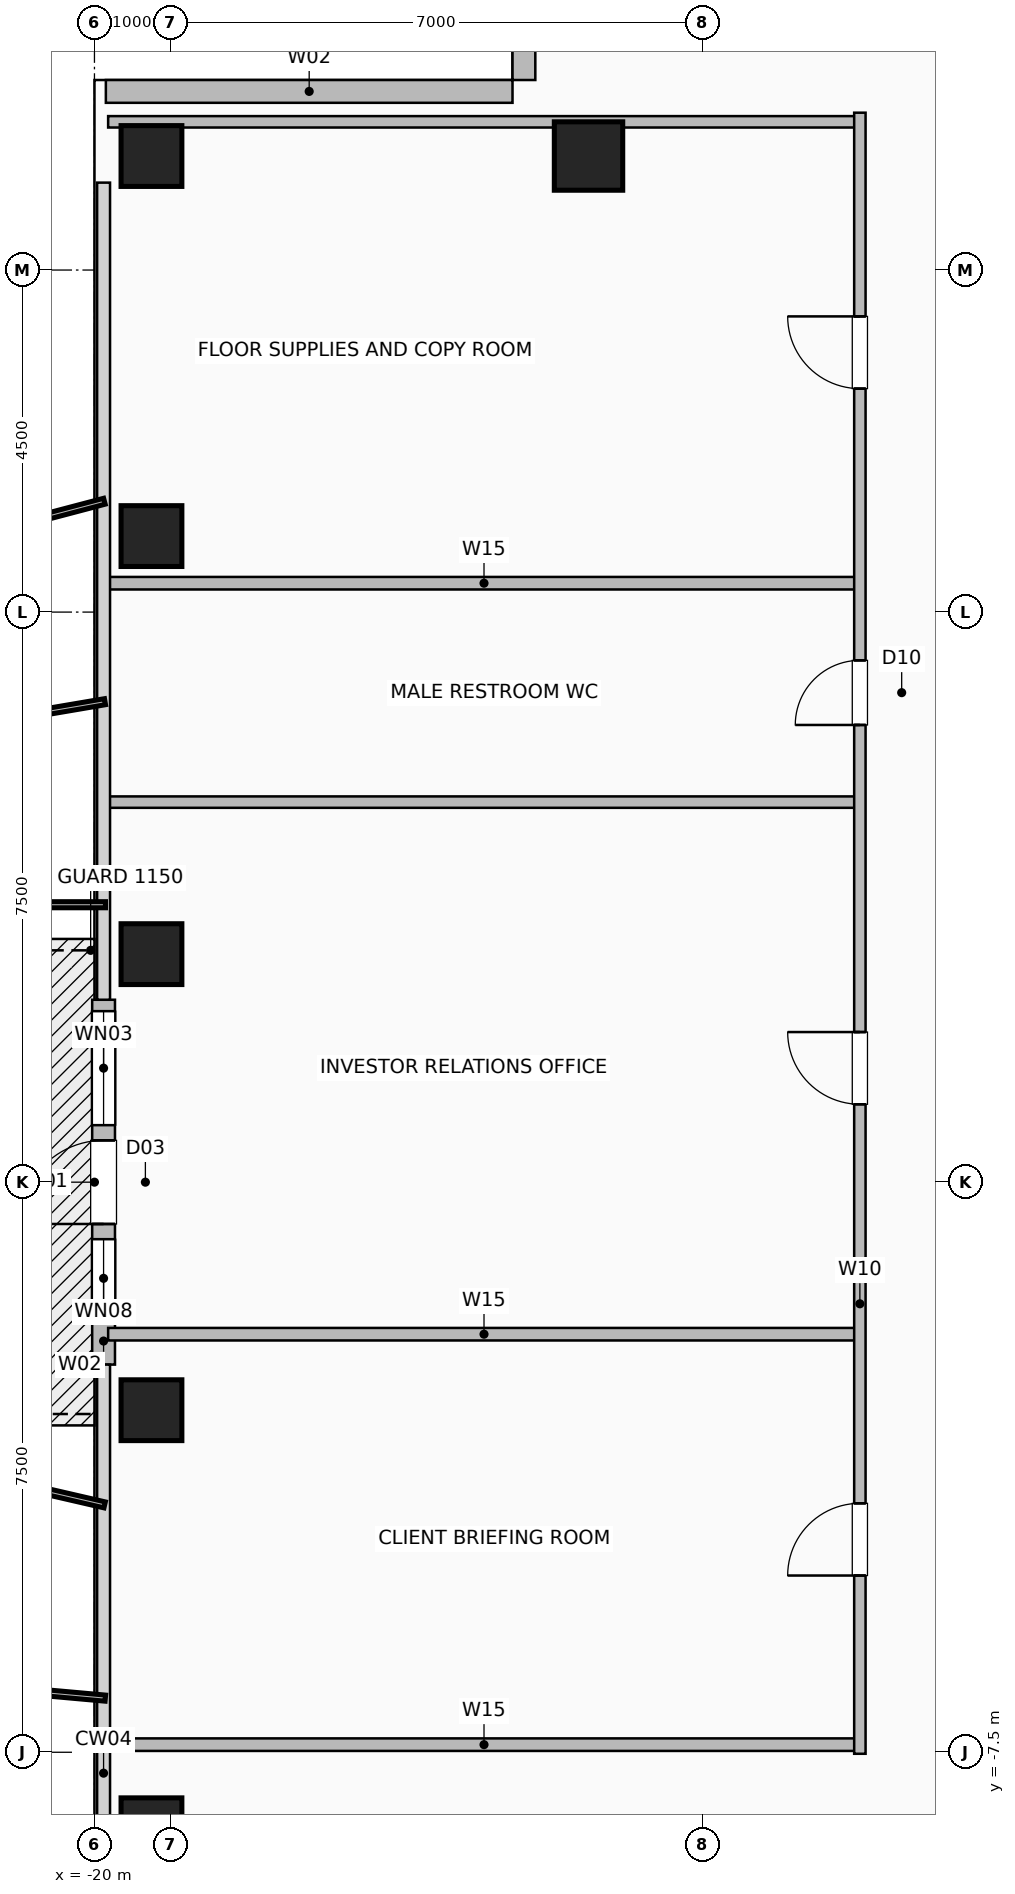
"""IFC4 building model, lengths in metres.
Left out: names, types, materials, properties, quantities, classifications, styles, units other than length and angle.
Written with IfcOpenShell. Run it as: python <this file> out.ifc"""

import sys

from ifc_helpers import new_model, si_unit, direction, frame, frame_2d, origin, origin_2d, place, context, subcontext, project, spatial, rectangle, hollow_rectangle, extrude, element, fill, save


model = new_model("IFC4")
c1 = context("Model", 3, precision=1e-05, world=origin(), true_north=direction((0.0, 1.0)))
c2 = subcontext(c1, "Body", "Model", "MODEL_VIEW")
j1 = project(units=[si_unit("LENGTHUNIT", "METRE"), si_unit("PLANEANGLEUNIT", "RADIAN")], contexts=[c1])
p1 = place(None, origin())
s1 = spatial("IfcSite", under=j1, at=p1, CompositionType="ELEMENT")
p2 = place(p1, origin())
s2 = spatial("IfcBuilding", under=s1, at=p2, CompositionType="ELEMENT")
p3 = place(p2, frame((0.0, 0.0, 216.6)))
s3 = spatial("IfcBuildingStorey", under=s2, at=p3, CompositionType="ELEMENT", Elevation=216.6)
for number, where, z_axis, x_axis in (
    (1, (-19.25, -8.5, 0.0), (0.0, 0.0, 1.0), (1.0, 0.0, 0.0)),
    (2, (-19.25, -3.0, 0.0), (0.0, 0.0, 1.0), (1.0, 0.0, 0.0)),
    (3, (-19.25, 3.0, 0.0), (0.0, 0.0, 1.0), (1.0, 0.0, 0.0)),
    (4, (-19.25, 8.5, 0.0), (0.0, 0.0, 1.0), (1.0, 0.0, 0.0)),
    (5, (-19.25, 13.5, 0.0), (0.0, 0.0, 1.0), (1.0, 0.0, 0.0)),
):
    element("IfcColumn", number, at=place(p3, frame(where, z_axis=z_axis, x_axis=x_axis)), inside=s3, PredefinedType="COLUMN", context=c2, shape_type="SweptSolid", body=[
        extrude(hollow_rectangle(XDim=0.8, YDim=0.8, WallThickness=0.04, at=origin_2d()), origin(), (0.0, 0.0, 1.0), 3.6),
    ])
p4 = place(p3, frame((-13.5, 13.5, 0.0), z_axis=(0.0, 0.0, 1.0), x_axis=(1.0, 0.0, 0.0)))
e6 = element("IfcColumn", 6, at=p4, inside=s3, PredefinedType="COLUMN", context=c2, shape_type="SweptSolid", body=[
    extrude(hollow_rectangle(XDim=0.9, YDim=0.9, WallThickness=0.045, at=origin_2d()), origin(), (0.0, 0.0, 1.0), 3.6),
])
p5 = place(p3, frame((-19.88, -2.4, 0.0), z_axis=(0.0, 0.0, 1.0), x_axis=(0.0, 1.0, 0.0)))
e7 = element("IfcWall", 7, at=p5, inside=s3, PredefinedType="SOLIDWALL", context=c2, shape_type="SweptSolid", body=[
    extrude(rectangle(XDim=4.8, YDim=0.3, at=frame_2d((2.4, 0.0))), origin(), (0.0, 0.0, 1.0), 3.36),
])
p6 = place(p5, frame((1.85, 0.0, 0.0)))
e8 = element("IfcOpeningElement", 8, at=p6, cuts=e7, PredefinedType="OPENING", context=c2, shape_type="SweptSolid", body=[
    extrude(rectangle(XDim=1.1, YDim=2.2, at=frame_2d((0.55, 1.1))), frame((0.0, 0.16, 0.0), z_axis=(0.0, -1.0, 0.0), x_axis=(1.0, 0.0, 0.0)), (0.0, 0.0, 1.0), 0.32),
])
p7 = place(p5, frame((0.62, 0.0, 0.85)))
e9 = element("IfcOpeningElement", 9, at=p7, cuts=e7, PredefinedType="OPENING", context=c2, shape_type="SweptSolid", body=[
    extrude(rectangle(XDim=1.03, YDim=1.8, at=frame_2d((0.515, 0.9))), frame((0.0, 0.16, 0.0), z_axis=(0.0, -1.0, 0.0), x_axis=(1.0, 0.0, 0.0)), (0.0, 0.0, 1.0), 0.32),
])
p8 = place(p5, frame((3.15, 0.0, 0.85)))
e10 = element("IfcOpeningElement", 10, at=p8, cuts=e7, PredefinedType="OPENING", context=c2, shape_type="SweptSolid", body=[
    extrude(rectangle(XDim=1.5, YDim=1.8, at=frame_2d((0.75, 0.9))), frame((0.0, 0.16, 0.0), z_axis=(0.0, -1.0, 0.0), x_axis=(1.0, 0.0, 0.0)), (0.0, 0.0, 1.0), 0.32),
])
p9 = place(p3, frame((-14.35, 19.85, 0.0), z_axis=(0.0, 0.0, 1.0), x_axis=(0.0, -1.0, 0.0)))
e11 = element("IfcWall", 11, at=p9, inside=s3, PredefinedType="SOLIDWALL", context=c2, shape_type="SweptSolid", body=[
    extrude(rectangle(XDim=5.35, YDim=0.3, at=frame_2d((2.675, 0.0))), origin(), (0.0, 0.0, 1.0), 3.36),
])
p10 = place(p9, frame((1.925, 0.0, 0.9)))
e12 = element("IfcOpeningElement", 12, at=p10, cuts=e11, PredefinedType="OPENING", context=c2, shape_type="SweptSolid", body=[
    extrude(rectangle(XDim=1.5, YDim=1.8, at=frame_2d((0.75, 0.9))), frame((0.0, 0.16, 0.0), z_axis=(0.0, -1.0, 0.0), x_axis=(1.0, 0.0, 0.0)), (0.0, 0.0, 1.0), 0.32),
])
p11 = place(p3, frame((-19.85, 14.35, 0.0), z_axis=(0.0, 0.0, 1.0), x_axis=(1.0, 0.0, 0.0)))
e13 = element("IfcWall", 13, at=p11, inside=s3, PredefinedType="SOLIDWALL", context=c2, shape_type="SweptSolid", body=[
    extrude(rectangle(XDim=5.35, YDim=0.3, at=frame_2d((2.675, 0.0))), origin(), (0.0, 0.0, 1.0), 3.36),
])
for number, where, z_axis, x_axis in (
    (14, (-19.82, 7.88, 0.0), (0.0, 0.0, 1.0), (1.0, 0.0, 0.0)),
    (15, (-19.82, -7.4, 0.0), (0.0, 0.0, 1.0), (1.0, 0.0, 0.0)),
    (16, (-19.82, -2.0, 0.0), (0.0, 0.0, 1.0), (1.0, 0.0, 0.0)),
):
    element("IfcWall", number, at=place(p3, frame(where, z_axis=z_axis, x_axis=x_axis)), inside=s3, PredefinedType="PLUMBINGWALL", context=c2, shape_type="SweptSolid", body=[
        extrude(rectangle(XDim=9.89, YDim=0.165, at=frame_2d((4.945, 0.0))), origin(), (0.0, 0.0, 1.0), 3.36),
    ])
for number, where, z_axis, x_axis in (
    (17, (-19.82, 5.0, 0.0), (0.0, 0.0, 1.0), (1.0, 0.0, 0.0)),
    (18, (-19.82, 13.95, 0.0), (0.0, 0.0, 1.0), (1.0, 0.0, 0.0)),
):
    element("IfcWall", number, at=place(p3, frame(where, z_axis=z_axis, x_axis=x_axis)), inside=s3, PredefinedType="PARTITIONING", context=c2, shape_type="SweptSolid", body=[
        extrude(rectangle(XDim=9.89, YDim=0.15, at=frame_2d((4.945, 0.0))), origin(), (0.0, 0.0, 1.0), 3.36),
    ])
p12 = place(p3, frame((-9.93, -7.52, 0.0), z_axis=(0.0, 0.0, 1.0), x_axis=(0.0, 1.0, 0.0)))
e19 = element("IfcWall", 19, at=p12, inside=s3, PredefinedType="PARTITIONING", context=c2, shape_type="SweptSolid", body=[
    extrude(rectangle(XDim=21.59, YDim=0.15, at=frame_2d((10.795, 0.0))), origin(), (0.0, 0.0, 1.0), 3.36),
])
p13 = place(p12, frame((2.345, 0.0, 0.0)))
e20 = element("IfcOpeningElement", 20, at=p13, cuts=e19, PredefinedType="OPENING", context=c2, shape_type="SweptSolid", body=[
    extrude(rectangle(XDim=0.95, YDim=2.06, at=frame_2d((0.475, 1.03))), frame((0.0, 0.085, 0.0), z_axis=(0.0, -1.0, 0.0), x_axis=(1.0, 0.0, 0.0)), (0.0, 0.0, 1.0), 0.17),
])
p14 = place(p12, frame((8.545, 0.0, 0.0)))
e21 = element("IfcOpeningElement", 21, at=p14, cuts=e19, PredefinedType="OPENING", context=c2, shape_type="SweptSolid", body=[
    extrude(rectangle(XDim=0.95, YDim=2.06, at=frame_2d((0.475, 1.03))), frame((0.0, 0.085, 0.0), z_axis=(0.0, -1.0, 0.0), x_axis=(1.0, 0.0, 0.0)), (0.0, 0.0, 1.0), 0.17),
])
p15 = place(p12, frame((13.535, 0.0, 0.0)))
e22 = element("IfcOpeningElement", 22, at=p15, cuts=e19, PredefinedType="OPENING", context=c2, shape_type="SweptSolid", body=[
    extrude(rectangle(XDim=0.85, YDim=2.05, at=frame_2d((0.425, 1.025))), frame((0.0, 0.085, 0.0), z_axis=(0.0, -1.0, 0.0), x_axis=(1.0, 0.0, 0.0)), (0.0, 0.0, 1.0), 0.17),
])
p16 = place(p12, frame((17.96, 0.0, 0.0)))
e23 = element("IfcOpeningElement", 23, at=p16, cuts=e19, PredefinedType="OPENING", context=c2, shape_type="SweptSolid", body=[
    extrude(rectangle(XDim=0.95, YDim=2.06, at=frame_2d((0.475, 1.03))), frame((0.0, 0.085, 0.0), z_axis=(0.0, -1.0, 0.0), x_axis=(1.0, 0.0, 0.0)), (0.0, 0.0, 1.0), 0.17),
])
p17 = place(p6, origin())
e24 = element("IfcDoor", 24, at=p17, inside=s3, OperationType="SINGLE_SWING_LEFT", PredefinedType="DOOR", context=c2, shape_type="SweptSolid", body=[
    extrude(rectangle(XDim=1.1, YDim=2.2, at=frame_2d((0.55, 1.1))), frame((0.0, 0.025, 0.0), z_axis=(0.0, -1.0, 0.0), x_axis=(1.0, 0.0, 0.0)), (0.0, 0.0, 1.0), 0.05),
])
fill(e8, e24)
p18 = place(p7, origin())
e25 = element("IfcWindow", 25, at=p18, inside=s3, PartitioningType="SINGLE_PANEL", PredefinedType="WINDOW", context=c2, shape_type="SweptSolid", body=[
    extrude(rectangle(XDim=1.03, YDim=1.8, at=frame_2d((0.515, 0.9))), frame((0.0, 0.03, 0.0), z_axis=(0.0, -1.0, 0.0), x_axis=(1.0, 0.0, 0.0)), (0.0, 0.0, 1.0), 0.06),
])
fill(e9, e25)
p19 = place(p8, origin())
e26 = element("IfcWindow", 26, at=p19, inside=s3, PartitioningType="SINGLE_PANEL", PredefinedType="WINDOW", context=c2, shape_type="SweptSolid", body=[
    extrude(rectangle(XDim=1.5, YDim=1.8, at=frame_2d((0.75, 0.9))), frame((0.0, 0.03, 0.0), z_axis=(0.0, -1.0, 0.0), x_axis=(1.0, 0.0, 0.0)), (0.0, 0.0, 1.0), 0.06),
])
fill(e10, e26)
p20 = place(p13, origin())
e27 = element("IfcDoor", 27, at=p20, inside=s3, OperationType="SINGLE_SWING_LEFT", PredefinedType="DOOR", context=c2, shape_type="SweptSolid", body=[
    extrude(rectangle(XDim=0.95, YDim=2.06, at=frame_2d((0.475, 1.03))), frame((0.0, 0.025, 0.0), z_axis=(0.0, -1.0, 0.0), x_axis=(1.0, 0.0, 0.0)), (0.0, 0.0, 1.0), 0.05),
])
fill(e20, e27)
p21 = place(p14, origin())
e28 = element("IfcDoor", 28, at=p21, inside=s3, OperationType="SINGLE_SWING_RIGHT", PredefinedType="DOOR", context=c2, shape_type="SweptSolid", body=[
    extrude(rectangle(XDim=0.95, YDim=2.06, at=frame_2d((0.475, 1.03))), frame((0.0, 0.025, 0.0), z_axis=(0.0, -1.0, 0.0), x_axis=(1.0, 0.0, 0.0)), (0.0, 0.0, 1.0), 0.05),
])
fill(e21, e28)
p22 = place(p15, origin())
e29 = element("IfcDoor", 29, at=p22, inside=s3, OperationType="SINGLE_SWING_LEFT", PredefinedType="DOOR", context=c2, shape_type="SweptSolid", body=[
    extrude(rectangle(XDim=0.85, YDim=2.05, at=frame_2d((0.425, 1.025))), frame((0.0, 0.025, 0.0), z_axis=(0.0, -1.0, 0.0), x_axis=(1.0, 0.0, 0.0)), (0.0, 0.0, 1.0), 0.05),
])
fill(e22, e29)
p23 = place(p16, origin())
e30 = element("IfcDoor", 30, at=p23, inside=s3, OperationType="SINGLE_SWING_RIGHT", PredefinedType="DOOR", context=c2, shape_type="SweptSolid", body=[
    extrude(rectangle(XDim=0.95, YDim=2.06, at=frame_2d((0.475, 1.03))), frame((0.0, 0.025, 0.0), z_axis=(0.0, -1.0, 0.0), x_axis=(1.0, 0.0, 0.0)), (0.0, 0.0, 1.0), 0.05),
])
fill(e23, e30)
save(model, sys.argv[1])
